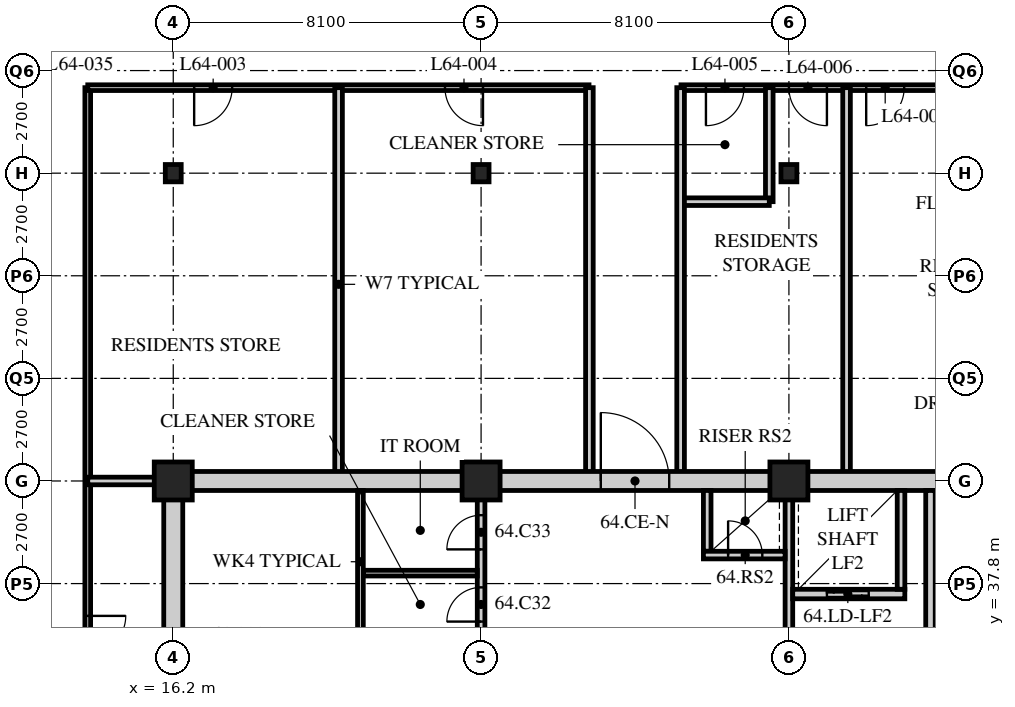
"""IFC4 building model, lengths in metres.
Left out: names, types, materials, properties, quantities, classifications, styles, units other than length and angle.
Written with IfcOpenShell. Run it as: python <this file> out.ifc"""

import sys

from ifc_helpers import new_model, si_unit, direction, frame, frame_2d, origin, origin_2d, place, context, subcontext, project, spatial, rectangle, hollow_rectangle, i_section, extrude, element, fill, save


model = new_model("IFC4")
c1 = context("Model", 3, precision=1e-05, world=origin(), true_north=direction((0.0, 1.0)))
c2 = subcontext(c1, "Body", "Model", "MODEL_VIEW")
j1 = project(units=[si_unit("LENGTHUNIT", "METRE"), si_unit("PLANEANGLEUNIT", "RADIAN")], contexts=[c1])
p1 = place(None, origin())
s1 = spatial("IfcSite", under=j1, at=p1, CompositionType="ELEMENT")
p2 = place(p1, origin())
s2 = spatial("IfcBuilding", under=s1, at=p2, CompositionType="ELEMENT")
p3 = place(p2, frame((0.0, 0.0, 250.2)))
s3 = spatial("IfcBuildingStorey", under=s2, at=p3, CompositionType="ELEMENT", Elevation=250.2)
p4 = place(p3, frame((16.2, 40.5, 0.0), z_axis=(0.0, 0.0, 1.0), x_axis=(1.0, 0.0, 0.0)))
e1 = element("IfcColumn", 1, at=p4, inside=s3, PredefinedType="COLUMN", context=c2, shape_type="SweptSolid", body=[
    extrude(hollow_rectangle(XDim=1.0, YDim=1.0, WallThickness=0.1, at=origin_2d()), origin(), (0.0, 0.0, 1.0), 3.9),
])
p5 = place(p3, frame((16.2, 48.6, 0.0), z_axis=(0.0, 0.0, 1.0), x_axis=(1.0, 0.0, 0.0)))
e2 = element("IfcColumn", 2, at=p5, inside=s3, PredefinedType="COLUMN", context=c2, shape_type="SweptSolid", body=[
    extrude(i_section(OverallWidth=0.418, OverallDepth=0.456, WebThickness=0.042, FlangeThickness=0.067, FilletRadius=0.015, at=origin_2d()), origin(), (0.0, 0.0, 1.0), 3.9),
])
p6 = place(p3, frame((24.3, 40.5, 0.0), z_axis=(0.0, 0.0, 1.0), x_axis=(1.0, 0.0, 0.0)))
e3 = element("IfcColumn", 3, at=p6, inside=s3, PredefinedType="COLUMN", context=c2, shape_type="SweptSolid", body=[
    extrude(hollow_rectangle(XDim=1.0, YDim=1.0, WallThickness=0.1, at=origin_2d()), origin(), (0.0, 0.0, 1.0), 3.9),
])
p7 = place(p3, frame((24.3, 48.6, 0.0), z_axis=(0.0, 0.0, 1.0), x_axis=(1.0, 0.0, 0.0)))
e4 = element("IfcColumn", 4, at=p7, inside=s3, PredefinedType="COLUMN", context=c2, shape_type="SweptSolid", body=[
    extrude(i_section(OverallWidth=0.418, OverallDepth=0.456, WebThickness=0.042, FlangeThickness=0.067, FilletRadius=0.015, at=origin_2d()), origin(), (0.0, 0.0, 1.0), 3.9),
])
p8 = place(p3, frame((32.4, 40.5, 0.0), z_axis=(0.0, 0.0, 1.0), x_axis=(1.0, 0.0, 0.0)))
e5 = element("IfcColumn", 5, at=p8, inside=s3, PredefinedType="COLUMN", context=c2, shape_type="SweptSolid", body=[
    extrude(hollow_rectangle(XDim=1.0, YDim=1.0, WallThickness=0.1, at=origin_2d()), origin(), (0.0, 0.0, 1.0), 3.9),
])
p9 = place(p3, frame((32.4, 48.6, 0.0), z_axis=(0.0, 0.0, 1.0), x_axis=(1.0, 0.0, 0.0)))
e6 = element("IfcColumn", 6, at=p9, inside=s3, PredefinedType="COLUMN", context=c2, shape_type="SweptSolid", body=[
    extrude(i_section(OverallWidth=0.418, OverallDepth=0.456, WebThickness=0.042, FlangeThickness=0.067, FilletRadius=0.015, at=origin_2d()), origin(), (0.0, 0.0, 1.0), 3.9),
])
p10 = place(p3, frame((13.95, 24.3, 0.0), z_axis=(0.0, 0.0, 1.0), x_axis=(0.0, 1.0, 0.0)))
e7 = element("IfcWall", 7, at=p10, inside=s3, PredefinedType="PARTITIONING", context=c2, shape_type="SweptSolid", body=[
    extrude(rectangle(XDim=26.55, YDim=0.15, at=frame_2d((13.275, 0.0))), origin(), (0.0, 0.0, 1.0), 3.69),
])
p11 = place(p10, frame((3.55, 0.0, 0.0)))
e8 = element("IfcOpeningElement", 8, at=p11, cuts=e7, PredefinedType="OPENING", context=c2, shape_type="SweptSolid", body=[
    extrude(rectangle(XDim=1.0, YDim=2.1, at=frame_2d((0.5, 1.05))), frame((0.0, 0.085, 0.0), z_axis=(0.0, -1.0, 0.0), x_axis=(1.0, 0.0, 0.0)), (0.0, 0.0, 1.0), 0.17),
])
p12 = place(p10, frame((11.65, 0.0, 0.0)))
e9 = element("IfcOpeningElement", 9, at=p12, cuts=e7, PredefinedType="OPENING", context=c2, shape_type="SweptSolid", body=[
    extrude(rectangle(XDim=1.0, YDim=2.1, at=frame_2d((0.5, 1.05))), frame((0.0, 0.085, 0.0), z_axis=(0.0, -1.0, 0.0), x_axis=(1.0, 0.0, 0.0)), (0.0, 0.0, 1.0), 0.17),
])
p13 = place(p3, frame((13.95, 50.85, 0.0), z_axis=(0.0, 0.0, 1.0), x_axis=(1.0, 0.0, 0.0)))
e10 = element("IfcWall", 10, at=p13, inside=s3, PredefinedType="PARTITIONING", context=c2, shape_type="SweptSolid", body=[
    extrude(rectangle(XDim=13.19, YDim=0.15, at=frame_2d((6.595, 0.0))), origin(), (0.0, 0.0, 1.0), 3.69),
])
p14 = place(p13, frame((2.8, 0.0, 0.0)))
e11 = element("IfcOpeningElement", 11, at=p14, cuts=e10, PredefinedType="OPENING", context=c2, shape_type="SweptSolid", body=[
    extrude(rectangle(XDim=1.0, YDim=2.1, at=frame_2d((0.5, 1.05))), frame((0.0, 0.085, 0.0), z_axis=(0.0, -1.0, 0.0), x_axis=(1.0, 0.0, 0.0)), (0.0, 0.0, 1.0), 0.17),
])
p15 = place(p13, frame((9.4, 0.0, 0.0)))
e12 = element("IfcOpeningElement", 12, at=p15, cuts=e10, PredefinedType="OPENING", context=c2, shape_type="SweptSolid", body=[
    extrude(rectangle(XDim=1.0, YDim=2.1, at=frame_2d((0.5, 1.05))), frame((0.0, 0.085, 0.0), z_axis=(0.0, -1.0, 0.0), x_axis=(1.0, 0.0, 0.0)), (0.0, 0.0, 1.0), 0.17),
])
p16 = place(p3, frame((29.56, 50.85, 0.0), z_axis=(0.0, 0.0, 1.0), x_axis=(1.0, 0.0, 0.0)))
e13 = element("IfcWall", 13, at=p16, inside=s3, PredefinedType="PARTITIONING", context=c2, shape_type="SweptSolid", body=[
    extrude(rectangle(XDim=6.89, YDim=0.15, at=frame_2d((3.445, 0.0))), origin(), (0.0, 0.0, 1.0), 3.69),
])
p17 = place(p16, frame((0.657, 0.0, 0.0)))
e14 = element("IfcOpeningElement", 14, at=p17, cuts=e13, PredefinedType="OPENING", context=c2, shape_type="SweptSolid", body=[
    extrude(rectangle(XDim=1.0, YDim=2.1, at=frame_2d((0.5, 1.05))), frame((0.0, 0.085, 0.0), z_axis=(0.0, -1.0, 0.0), x_axis=(1.0, 0.0, 0.0)), (0.0, 0.0, 1.0), 0.17),
])
p18 = place(p16, frame((2.84, 0.0, 0.0)))
e15 = element("IfcOpeningElement", 15, at=p18, cuts=e13, PredefinedType="OPENING", context=c2, shape_type="SweptSolid", body=[
    extrude(rectangle(XDim=1.0, YDim=2.1, at=frame_2d((0.5, 1.05))), frame((0.0, 0.085, 0.0), z_axis=(0.0, -1.0, 0.0), x_axis=(1.0, 0.0, 0.0)), (0.0, 0.0, 1.0), 0.17),
])
p19 = place(p16, frame((4.873, 0.0, 0.0)))
e16 = element("IfcOpeningElement", 16, at=p19, cuts=e13, PredefinedType="OPENING", context=c2, shape_type="SweptSolid", body=[
    extrude(rectangle(XDim=1.0, YDim=2.1, at=frame_2d((0.5, 1.05))), frame((0.0, 0.085, 0.0), z_axis=(0.0, -1.0, 0.0), x_axis=(1.0, 0.0, 0.0)), (0.0, 0.0, 1.0), 0.17),
])
p20 = place(p3, frame((20.55, 50.85, 0.0), z_axis=(0.0, 0.0, 1.0), x_axis=(0.0, -1.0, 0.0)))
e17 = element("IfcWall", 17, at=p20, inside=s3, PredefinedType="SOLIDWALL", context=c2, shape_type="SweptSolid", body=[
    extrude(rectangle(XDim=10.35, YDim=0.2, at=frame_2d((5.175, 0.0))), origin(), (0.0, 0.0, 1.0), 3.69),
])
p21 = place(p3, frame((31.883, 50.85, 0.0), z_axis=(0.0, 0.0, 1.0), x_axis=(0.0, -1.0, 0.0)))
e18 = element("IfcWall", 18, at=p21, inside=s3, PredefinedType="SOLIDWALL", context=c2, shape_type="SweptSolid", body=[
    extrude(rectangle(XDim=3.0, YDim=0.2, at=frame_2d((1.5, 0.0))), origin(), (0.0, 0.0, 1.0), 3.69),
])
p22 = place(p3, frame((29.55, 47.85, 0.0), z_axis=(0.0, 0.0, 1.0), x_axis=(1.0, 0.0, 0.0)))
e19 = element("IfcWall", 19, at=p22, inside=s3, PredefinedType="SOLIDWALL", context=c2, shape_type="SweptSolid", body=[
    extrude(rectangle(XDim=2.333, YDim=0.2, at=frame_2d((1.167, 0.0))), origin(), (0.0, 0.0, 1.0), 3.69),
])
for number, where, z_axis, x_axis in (
    (20, (33.917, 50.85, 0.0), (0.0, 0.0, 1.0), (0.0, -1.0, 0.0)),
    (21, (27.15, 40.5, 0.0), (0.0, 0.0, 1.0), (0.0, 1.0, 0.0)),
    (22, (29.55, 40.5, 0.0), (0.0, 0.0, 1.0), (0.0, 1.0, 0.0)),
):
    element("IfcWall", number, at=place(p3, frame(where, z_axis=z_axis, x_axis=x_axis)), inside=s3, PredefinedType="SOLIDWALL", context=c2, shape_type="SweptSolid", body=[
        extrude(rectangle(XDim=10.35, YDim=0.2, at=frame_2d((5.175, 0.0))), origin(), (0.0, 0.0, 1.0), 3.69),
    ])
p23 = place(p3, frame((13.95, 40.5, 0.0), z_axis=(0.0, 0.0, 1.0), x_axis=(1.0, 0.0, 0.0)))
e23 = element("IfcWall", 23, at=p23, inside=s3, PredefinedType="SOLIDWALL", context=c2, shape_type="SweptSolid", body=[
    extrude(rectangle(XDim=2.25, YDim=0.2, at=frame_2d((1.125, 0.0))), origin(), (0.0, 0.0, 1.0), 3.078),
])
p24 = place(p3, frame((15.95, 40.5, 0.0), z_axis=(0.0, 0.0, 1.0), x_axis=(1.0, 0.0, 0.0)))
e24 = element("IfcWall", 24, at=p24, inside=s3, PredefinedType="SOLIDWALL", context=c2, shape_type="SweptSolid", body=[
    extrude(rectangle(XDim=24.55, YDim=0.5, at=frame_2d((12.275, 0.0))), origin(), (0.0, 0.0, 1.0), 3.04),
])
p25 = place(p24, frame((11.5, 0.0, 0.0)))
e25 = element("IfcOpeningElement", 25, at=p25, cuts=e24, PredefinedType="OPENING", context=c2, shape_type="SweptSolid", body=[
    extrude(rectangle(XDim=1.8, YDim=2.4, at=frame_2d((0.9, 1.2))), frame((0.0, 0.26, 0.0), z_axis=(0.0, -1.0, 0.0), x_axis=(1.0, 0.0, 0.0)), (0.0, 0.0, 1.0), 0.52),
])
p26 = place(p3, frame((16.2, 24.55, 0.0), z_axis=(0.0, 0.0, 1.0), x_axis=(0.0, 1.0, 0.0)))
e26 = element("IfcWall", 26, at=p26, inside=s3, PredefinedType="SOLIDWALL", context=c2, shape_type="SweptSolid", body=[
    extrude(rectangle(XDim=15.7, YDim=0.5, at=frame_2d((7.85, 0.0))), origin(), (0.0, 0.0, 1.0), 3.078),
])
p27 = place(p3, frame((32.4, 32.5, 0.0), z_axis=(0.0, 0.0, 1.0), x_axis=(0.0, 1.0, 0.0)))
e27 = element("IfcWall", 27, at=p27, inside=s3, PredefinedType="SOLIDWALL", context=c2, shape_type="SweptSolid", body=[
    extrude(rectangle(XDim=7.75, YDim=0.2, at=frame_2d((3.875, 0.0))), origin(), (0.0, 0.0, 1.0), 3.078),
])
p28 = place(p27, frame((1.9, 0.0, 0.0)))
e28 = element("IfcOpeningElement", 28, at=p28, cuts=e27, PredefinedType="OPENING", context=c2, shape_type="SweptSolid", body=[
    extrude(rectangle(XDim=1.2, YDim=2.1, at=frame_2d((0.6, 1.05))), frame((0.0, 0.11, 0.0), z_axis=(0.0, -1.0, 0.0), x_axis=(1.0, 0.0, 0.0)), (0.0, 0.0, 1.0), 0.22),
])
p29 = place(p3, frame((36.125, 32.5, 0.0), z_axis=(0.0, 0.0, 1.0), x_axis=(0.0, 1.0, 0.0)))
e29 = element("IfcWall", 29, at=p29, inside=s3, PredefinedType="SOLIDWALL", context=c2, shape_type="SweptSolid", body=[
    extrude(rectangle(XDim=7.75, YDim=0.25, at=frame_2d((3.875, 0.0))), origin(), (0.0, 0.0, 1.0), 3.69),
])
p30 = place(p29, frame((0.45, 0.0, 0.0)))
e30 = element("IfcOpeningElement", 30, at=p30, cuts=e29, PredefinedType="OPENING", context=c2, shape_type="SweptSolid", body=[
    extrude(rectangle(XDim=1.2, YDim=2.1, at=frame_2d((0.6, 1.05))), frame((0.0, 0.135, 0.0), z_axis=(0.0, -1.0, 0.0), x_axis=(1.0, 0.0, 0.0)), (0.0, 0.0, 1.0), 0.27),
])
p31 = place(p3, frame((32.5, 37.525, 0.0), z_axis=(0.0, 0.0, 1.0), x_axis=(1.0, 0.0, 0.0)))
e31 = element("IfcWall", 31, at=p31, inside=s3, PredefinedType="SOLIDWALL", context=c2, shape_type="SweptSolid", body=[
    extrude(rectangle(XDim=2.95, YDim=0.25, at=frame_2d((1.475, 0.0))), origin(), (0.0, 0.0, 1.0), 3.69),
])
p32 = place(p31, frame((0.9, 0.0, 0.0)))
e32 = element("IfcOpeningElement", 32, at=p32, cuts=e31, PredefinedType="OPENING", context=c2, shape_type="SweptSolid", body=[
    extrude(rectangle(XDim=1.1, YDim=2.4, at=frame_2d((0.55, 1.2))), frame((0.0, 0.135, 0.0), z_axis=(0.0, -1.0, 0.0), x_axis=(1.0, 0.0, 0.0)), (0.0, 0.0, 1.0), 0.27),
])
p33 = place(p3, frame((35.35, 37.65, 0.0), z_axis=(0.0, 0.0, 1.0), x_axis=(0.0, 1.0, 0.0)))
e33 = element("IfcWall", 33, at=p33, inside=s3, PredefinedType="SOLIDWALL", context=c2, shape_type="SweptSolid", body=[
    extrude(rectangle(XDim=2.6, YDim=0.2, at=frame_2d((1.3, 0.0))), origin(), (0.0, 0.0, 1.0), 3.69),
])
p34 = place(p3, frame((30.25, 38.65, 0.0), z_axis=(0.0, 0.0, 1.0), x_axis=(0.0, 1.0, 0.0)))
e34 = element("IfcWall", 34, at=p34, inside=s3, PredefinedType="SOLIDWALL", context=c2, shape_type="SweptSolid", body=[
    extrude(rectangle(XDim=1.6, YDim=0.2, at=frame_2d((0.8, 0.0))), origin(), (0.0, 0.0, 1.0), 3.69),
])
p35 = place(p3, frame((30.15, 38.55, 0.0), z_axis=(0.0, 0.0, 1.0), x_axis=(1.0, 0.0, 0.0)))
e35 = element("IfcWall", 35, at=p35, inside=s3, PredefinedType="SOLIDWALL", context=c2, shape_type="SweptSolid", body=[
    extrude(rectangle(XDim=2.15, YDim=0.2, at=frame_2d((1.075, 0.0))), origin(), (0.0, 0.0, 1.0), 3.69),
])
p36 = place(p35, frame((0.65, 0.0, 0.0)))
e36 = element("IfcOpeningElement", 36, at=p36, cuts=e35, PredefinedType="OPENING", context=c2, shape_type="SweptSolid", body=[
    extrude(rectangle(XDim=0.9, YDim=2.1, at=frame_2d((0.45, 1.05))), frame((0.0, 0.11, 0.0), z_axis=(0.0, -1.0, 0.0), x_axis=(1.0, 0.0, 0.0)), (0.0, 0.0, 1.0), 0.22),
])
p37 = place(p3, frame((24.3, 32.5, 0.0), z_axis=(0.0, 0.0, 1.0), x_axis=(0.0, 1.0, 0.0)))
e37 = element("IfcWall", 37, at=p37, inside=s3, PredefinedType="PARTITIONING", context=c2, shape_type="SweptSolid", body=[
    extrude(rectangle(XDim=7.75, YDim=0.2, at=frame_2d((3.875, 0.0))), origin(), (0.0, 0.0, 1.0), 3.078),
])
p38 = place(p37, frame((0.8, 0.0, 0.0)))
e38 = element("IfcOpeningElement", 38, at=p38, cuts=e37, PredefinedType="OPENING", context=c2, shape_type="SweptSolid", body=[
    extrude(rectangle(XDim=0.9, YDim=2.1, at=frame_2d((0.45, 1.05))), frame((0.0, 0.11, 0.0), z_axis=(0.0, -1.0, 0.0), x_axis=(1.0, 0.0, 0.0)), (0.0, 0.0, 1.0), 0.22),
])
p39 = place(p37, frame((2.65, 0.0, 0.0)))
e39 = element("IfcOpeningElement", 39, at=p39, cuts=e37, PredefinedType="OPENING", context=c2, shape_type="SweptSolid", body=[
    extrude(rectangle(XDim=0.9, YDim=2.1, at=frame_2d((0.45, 1.05))), frame((0.0, 0.11, 0.0), z_axis=(0.0, -1.0, 0.0), x_axis=(1.0, 0.0, 0.0)), (0.0, 0.0, 1.0), 0.22),
])
p40 = place(p37, frame((4.3, 0.0, 0.0)))
e40 = element("IfcOpeningElement", 40, at=p40, cuts=e37, PredefinedType="OPENING", context=c2, shape_type="SweptSolid", body=[
    extrude(rectangle(XDim=0.9, YDim=2.1, at=frame_2d((0.45, 1.05))), frame((0.0, 0.11, 0.0), z_axis=(0.0, -1.0, 0.0), x_axis=(1.0, 0.0, 0.0)), (0.0, 0.0, 1.0), 0.22),
])
p41 = place(p37, frame((6.2, 0.0, 0.0)))
e41 = element("IfcOpeningElement", 41, at=p41, cuts=e37, PredefinedType="OPENING", context=c2, shape_type="SweptSolid", body=[
    extrude(rectangle(XDim=0.9, YDim=2.1, at=frame_2d((0.45, 1.05))), frame((0.0, 0.11, 0.0), z_axis=(0.0, -1.0, 0.0), x_axis=(1.0, 0.0, 0.0)), (0.0, 0.0, 1.0), 0.22),
])
p42 = place(p3, frame((21.2, 38.075, 0.0), z_axis=(0.0, 0.0, 1.0), x_axis=(1.0, 0.0, 0.0)))
e42 = element("IfcWall", 42, at=p42, inside=s3, PredefinedType="PARTITIONING", context=c2, shape_type="SweptSolid", body=[
    extrude(rectangle(XDim=3.0, YDim=0.15, at=frame_2d((1.5, 0.0))), origin(), (0.0, 0.0, 1.0), 3.69),
])
p43 = place(p3, frame((21.125, 36.5, 0.0), z_axis=(0.0, 0.0, 1.0), x_axis=(0.0, 1.0, 0.0)))
e43 = element("IfcWall", 43, at=p43, inside=s3, PredefinedType="PARTITIONING", context=c2, shape_type="SweptSolid", body=[
    extrude(rectangle(XDim=3.75, YDim=0.15, at=frame_2d((1.875, 0.0))), origin(), (0.0, 0.0, 1.0), 3.69),
])
p44 = place(p12, origin())
e44 = element("IfcDoor", 44, at=p44, inside=s3, OperationType="SINGLE_SWING_LEFT", PredefinedType="DOOR", context=c2, shape_type="SweptSolid", body=[
    extrude(rectangle(XDim=1.0, YDim=2.1, at=frame_2d((0.5, 1.05))), frame((0.0, 0.025, 0.0), z_axis=(0.0, -1.0, 0.0), x_axis=(1.0, 0.0, 0.0)), (0.0, 0.0, 1.0), 0.05),
])
fill(e9, e44)
p45 = place(p14, origin())
e45 = element("IfcDoor", 45, at=p45, inside=s3, OperationType="SINGLE_SWING_RIGHT", PredefinedType="DOOR", context=c2, shape_type="SweptSolid", body=[
    extrude(rectangle(XDim=1.0, YDim=2.1, at=frame_2d((0.5, 1.05))), frame((0.0, 0.025, 0.0), z_axis=(0.0, -1.0, 0.0), x_axis=(1.0, 0.0, 0.0)), (0.0, 0.0, 1.0), 0.05),
])
fill(e11, e45)
p46 = place(p15, origin())
e46 = element("IfcDoor", 46, at=p46, inside=s3, OperationType="SINGLE_SWING_LEFT", PredefinedType="DOOR", context=c2, shape_type="SweptSolid", body=[
    extrude(rectangle(XDim=1.0, YDim=2.1, at=frame_2d((0.5, 1.05))), frame((0.0, 0.025, 0.0), z_axis=(0.0, -1.0, 0.0), x_axis=(1.0, 0.0, 0.0)), (0.0, 0.0, 1.0), 0.05),
])
fill(e12, e46)
p47 = place(p17, origin())
e47 = element("IfcDoor", 47, at=p47, inside=s3, OperationType="SINGLE_SWING_RIGHT", PredefinedType="DOOR", context=c2, shape_type="SweptSolid", body=[
    extrude(rectangle(XDim=1.0, YDim=2.1, at=frame_2d((0.5, 1.05))), frame((0.0, 0.025, 0.0), z_axis=(0.0, -1.0, 0.0), x_axis=(1.0, 0.0, 0.0)), (0.0, 0.0, 1.0), 0.05),
])
fill(e14, e47)
p48 = place(p18, origin())
e48 = element("IfcDoor", 48, at=p48, inside=s3, OperationType="SINGLE_SWING_LEFT", PredefinedType="DOOR", context=c2, shape_type="SweptSolid", body=[
    extrude(rectangle(XDim=1.0, YDim=2.1, at=frame_2d((0.5, 1.05))), frame((0.0, 0.025, 0.0), z_axis=(0.0, -1.0, 0.0), x_axis=(1.0, 0.0, 0.0)), (0.0, 0.0, 1.0), 0.05),
])
fill(e15, e48)
p49 = place(p19, origin())
e49 = element("IfcDoor", 49, at=p49, inside=s3, OperationType="SINGLE_SWING_RIGHT", PredefinedType="DOOR", context=c2, shape_type="SweptSolid", body=[
    extrude(rectangle(XDim=1.0, YDim=2.1, at=frame_2d((0.5, 1.05))), frame((0.0, 0.025, 0.0), z_axis=(0.0, -1.0, 0.0), x_axis=(1.0, 0.0, 0.0)), (0.0, 0.0, 1.0), 0.05),
])
fill(e16, e49)
p50 = place(p40, origin())
e50 = element("IfcDoor", 50, at=p50, inside=s3, OperationType="SINGLE_SWING_LEFT", PredefinedType="DOOR", context=c2, shape_type="SweptSolid", body=[
    extrude(rectangle(XDim=0.9, YDim=2.1, at=frame_2d((0.45, 1.05))), frame((0.0, 0.025, 0.0), z_axis=(0.0, -1.0, 0.0), x_axis=(1.0, 0.0, 0.0)), (0.0, 0.0, 1.0), 0.05),
])
fill(e40, e50)
p51 = place(p41, origin())
e51 = element("IfcDoor", 51, at=p51, inside=s3, OperationType="SINGLE_SWING_LEFT", PredefinedType="DOOR", context=c2, shape_type="SweptSolid", body=[
    extrude(rectangle(XDim=0.9, YDim=2.1, at=frame_2d((0.45, 1.05))), frame((0.0, 0.025, 0.0), z_axis=(0.0, -1.0, 0.0), x_axis=(1.0, 0.0, 0.0)), (0.0, 0.0, 1.0), 0.05),
])
fill(e41, e51)
p52 = place(p36, origin())
e52 = element("IfcDoor", 52, at=p52, inside=s3, OperationType="SINGLE_SWING_LEFT", PredefinedType="DOOR", context=c2, shape_type="SweptSolid", body=[
    extrude(rectangle(XDim=0.9, YDim=2.1, at=frame_2d((0.45, 1.05))), frame((0.0, 0.025, 0.0), z_axis=(0.0, -1.0, 0.0), x_axis=(1.0, 0.0, 0.0)), (0.0, 0.0, 1.0), 0.05),
])
fill(e36, e52)
p53 = place(p32, origin())
e53 = element("IfcDoor", 53, at=p53, inside=s3, OperationType="DOUBLE_DOOR_SLIDING", PredefinedType="DOOR", context=c2, shape_type="SweptSolid", body=[
    extrude(rectangle(XDim=1.1, YDim=2.4, at=frame_2d((0.55, 1.2))), frame((0.0, 0.025, 0.0), z_axis=(0.0, -1.0, 0.0), x_axis=(1.0, 0.0, 0.0)), (0.0, 0.0, 1.0), 0.05),
])
fill(e32, e53)
p54 = place(p25, origin())
e54 = element("IfcDoor", 54, at=p54, inside=s3, OperationType="DOUBLE_DOOR_SINGLE_SWING", PredefinedType="DOOR", context=c2, shape_type="SweptSolid", body=[
    extrude(rectangle(XDim=1.8, YDim=2.4, at=frame_2d((0.9, 1.2))), frame((0.0, 0.025, 0.0), z_axis=(0.0, -1.0, 0.0), x_axis=(1.0, 0.0, 0.0)), (0.0, 0.0, 1.0), 0.05),
])
fill(e25, e54)
save(model, sys.argv[1])
